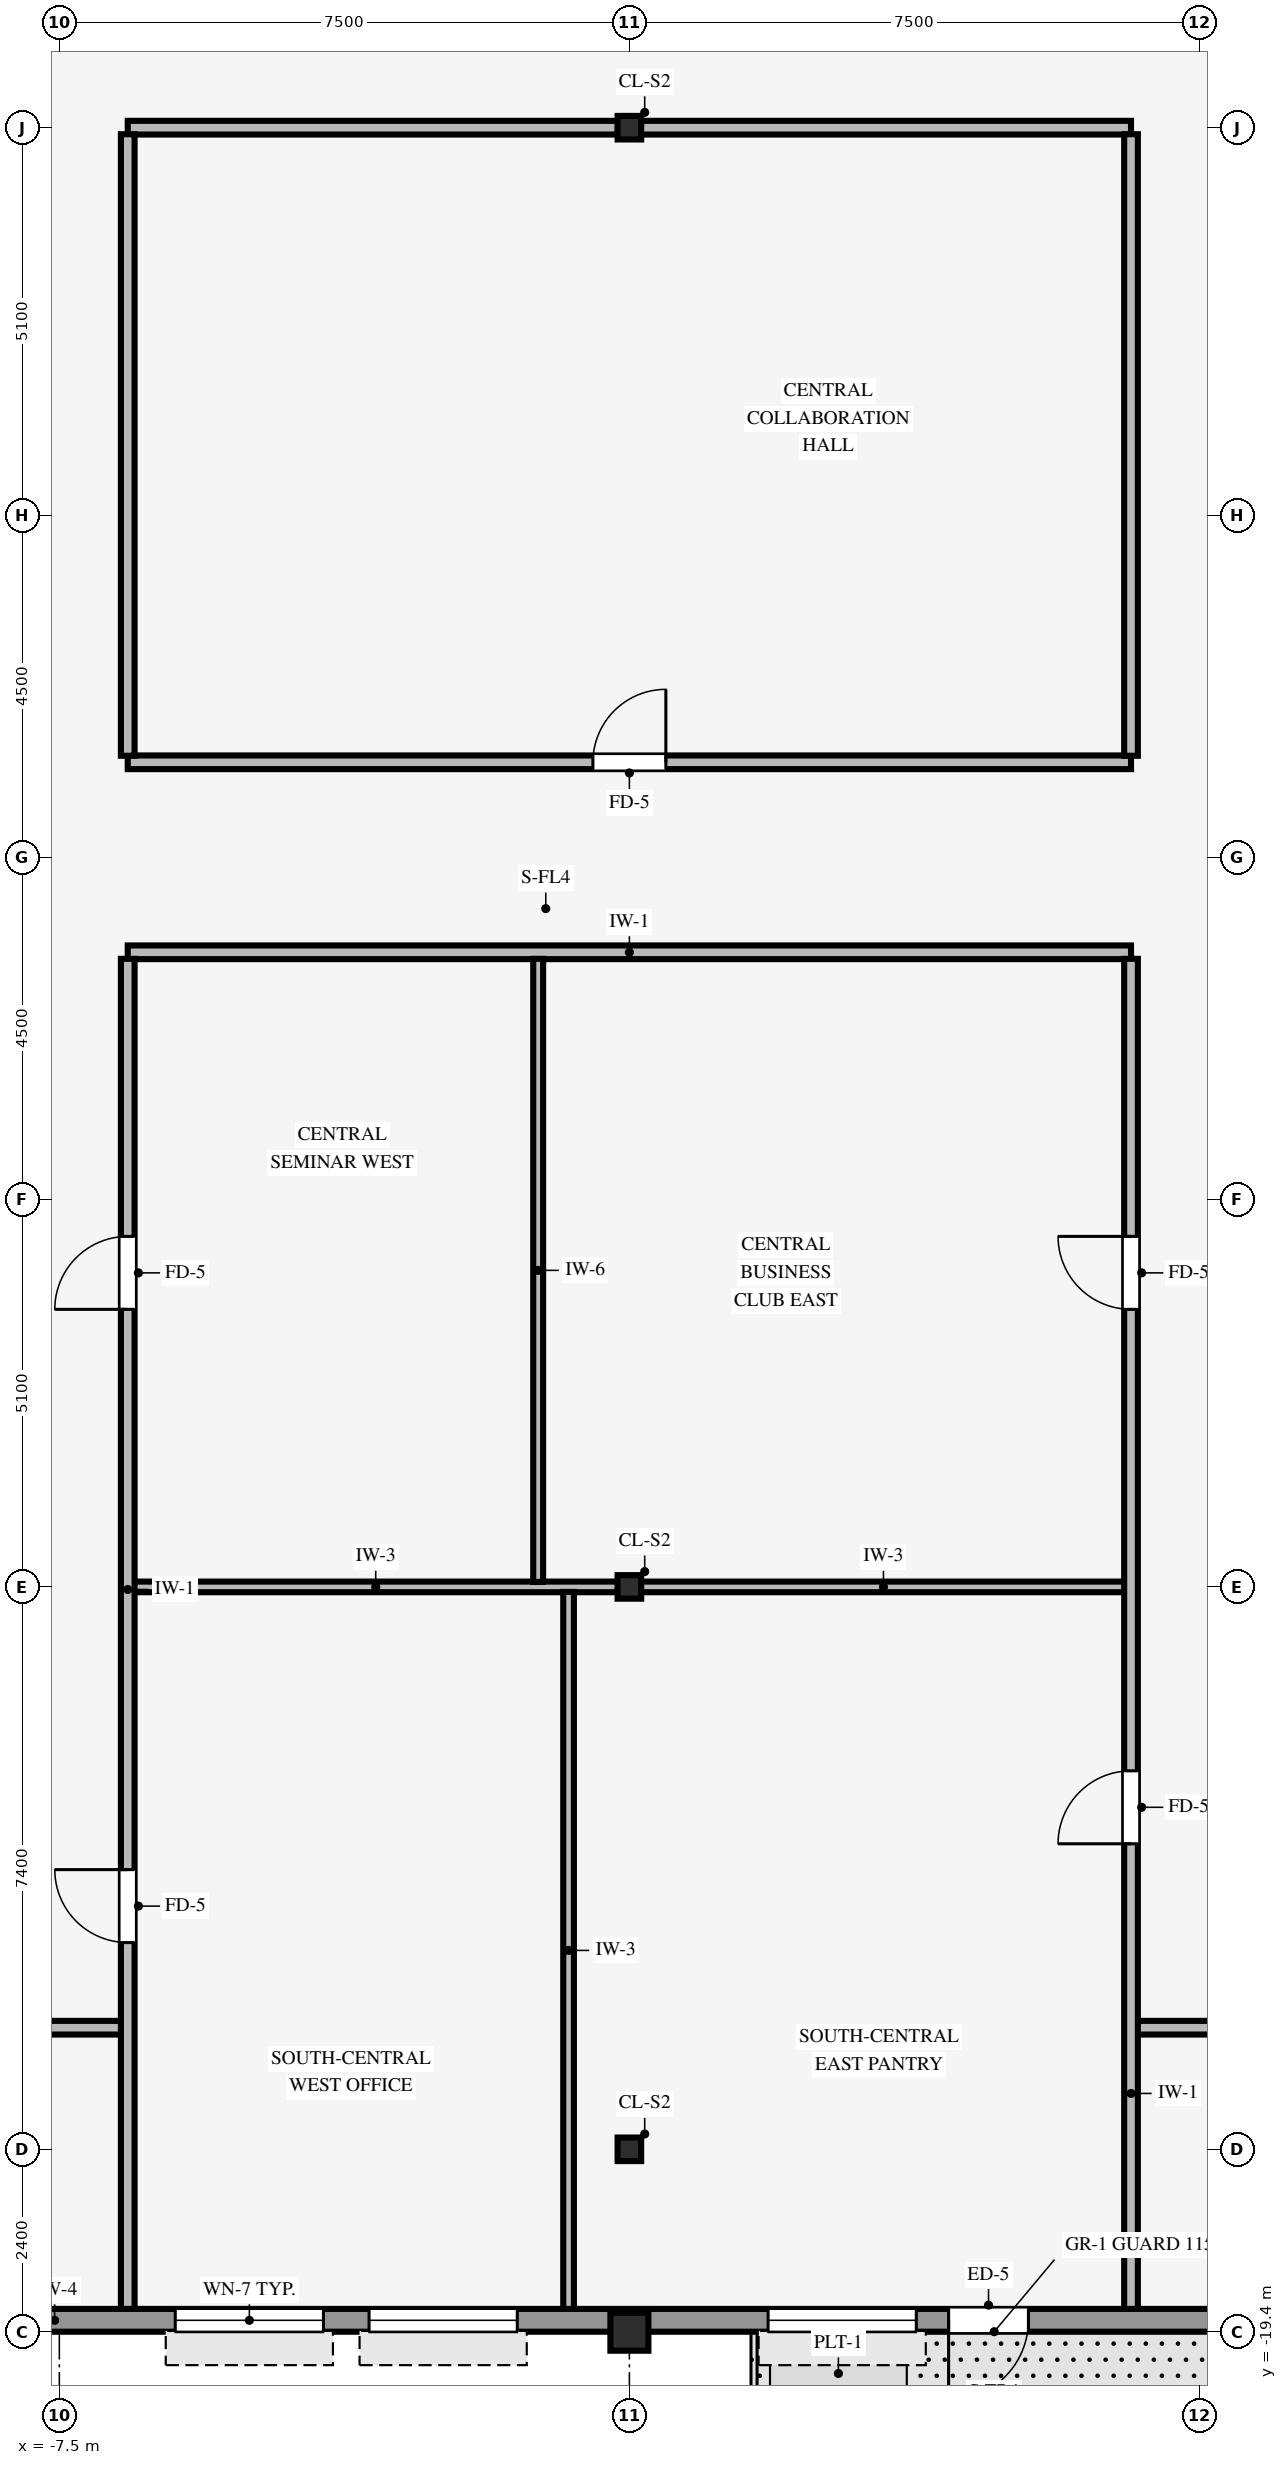
"""IFC4 building model, lengths in metres.
Left out: names, types, materials, properties, quantities, classifications, styles, units other than length and angle.
Written with IfcOpenShell. Run it as: python <this file> out.ifc"""

import sys

from ifc_helpers import new_model, si_unit, direction, frame, frame_2d, origin, origin_2d, place, context, subcontext, project, spatial, rectangle, hollow_rectangle, i_section, extrude, source, transform, mapped, element, fill, save


model = new_model("IFC4")
c1 = context("Model", 3, precision=1e-05, world=origin(), true_north=direction((0.0, 1.0)))
c2 = subcontext(c1, "Body", "Model", "MODEL_VIEW")
j1 = project(units=[si_unit("LENGTHUNIT", "METRE"), si_unit("PLANEANGLEUNIT", "RADIAN")], contexts=[c1])
p1 = place(None, origin())
s1 = spatial("IfcSite", under=j1, at=p1, CompositionType="ELEMENT")
p2 = place(p1, origin())
s2 = spatial("IfcBuilding", under=s1, at=p2, CompositionType="ELEMENT")
p3 = place(p2, frame((0.0, 0.0, 261.6)))
s3 = spatial("IfcBuildingStorey", under=s2, at=p3, CompositionType="ELEMENT", Elevation=261.6)
p4 = place(p3, frame((0.0, -19.4, 0.0), z_axis=(0.0, 0.0, 1.0), x_axis=(1.0, 0.0, 0.0)))
e1 = element("IfcColumn", 1, at=p4, inside=s3, PredefinedType="COLUMN", context=c2, shape_type="SweptSolid", body=[
    extrude(hollow_rectangle(XDim=0.5, YDim=0.5, WallThickness=0.032, InnerFilletRadius=0.032, OuterFilletRadius=0.064, at=origin_2d()), origin(), (0.0, 0.0, 1.0), 3.37),
])
for number, where, z_axis, x_axis in (
    (2, (0.0, -17.0, 0.0), (0.0, 0.0, 1.0), (1.0, 0.0, 0.0)),
    (3, (0.0, -9.6, 0.0), (0.0, 0.0, 1.0), (1.0, 0.0, 0.0)),
    (4, (0.0, 9.6, 0.0), (0.0, 0.0, 1.0), (1.0, 0.0, 0.0)),
):
    element("IfcColumn", number, at=place(p3, frame(where, z_axis=z_axis, x_axis=x_axis)), inside=s3, PredefinedType="COLUMN", context=c2, shape_type="SweptSolid", body=[
        extrude(i_section(OverallWidth=0.31, OverallDepth=0.31, WebThickness=0.015, FlangeThickness=0.015, FilletRadius=0.015, at=origin_2d()), origin(), (0.0, 0.0, 1.0), 3.37),
    ])
p5 = place(p3, frame((-18.9, -19.25, 0.0), z_axis=(0.0, 0.0, 1.0), x_axis=(1.0, 0.0, 0.0)))
e5 = element("IfcWall", 5, at=p5, inside=s3, PredefinedType="STANDARD", context=c2, shape_type="SweptSolid", body=[
    extrude(rectangle(XDim=35.6, YDim=0.3, at=frame_2d((17.8, 0.0))), origin(), (0.0, 0.0, 1.0), 2.705),
])
p6 = place(p5, frame((24.15, 0.0, 0.0), z_axis=(0.0, 0.0, 1.0), x_axis=(-1.0, 0.0, 0.0)))
e6 = element("IfcOpeningElement", 6, at=p6, cuts=e5, PredefinedType="OPENING", context=c2, shape_type="SweptSolid", body=[
    extrude(rectangle(XDim=1.05, YDim=2.1, at=frame_2d((0.525, 1.05))), frame((0.0, 0.16, 0.0), z_axis=(0.0, -1.0, 0.0), x_axis=(1.0, 0.0, 0.0)), (0.0, 0.0, 1.0), 0.32),
])
p7 = place(p5, frame((2.425, 0.0, 0.8)))
e7 = element("IfcOpeningElement", 7, at=p7, cuts=e5, PredefinedType="OPENING", context=c2, shape_type="SweptSolid", body=[
    extrude(rectangle(XDim=1.95, YDim=1.48, at=frame_2d((0.975, 0.74))), frame((0.0, 0.16, 0.0), z_axis=(0.0, -1.0, 0.0), x_axis=(1.0, 0.0, 0.0)), (0.0, 0.0, 1.0), 0.32),
])
p8 = place(p5, frame((7.225, 0.0, 0.8)))
e8 = element("IfcOpeningElement", 8, at=p8, cuts=e5, PredefinedType="OPENING", context=c2, shape_type="SweptSolid", body=[
    extrude(rectangle(XDim=1.95, YDim=1.48, at=frame_2d((0.975, 0.74))), frame((0.0, 0.16, 0.0), z_axis=(0.0, -1.0, 0.0), x_axis=(1.0, 0.0, 0.0)), (0.0, 0.0, 1.0), 0.32),
])
p9 = place(p5, frame((12.925, 0.0, 0.8)))
e9 = element("IfcOpeningElement", 9, at=p9, cuts=e5, PredefinedType="OPENING", context=c2, shape_type="SweptSolid", body=[
    extrude(rectangle(XDim=1.95, YDim=1.48, at=frame_2d((0.975, 0.74))), frame((0.0, 0.16, 0.0), z_axis=(0.0, -1.0, 0.0), x_axis=(1.0, 0.0, 0.0)), (0.0, 0.0, 1.0), 0.32),
])
p10 = place(p5, frame((15.475, 0.0, 0.8)))
e10 = element("IfcOpeningElement", 10, at=p10, cuts=e5, PredefinedType="OPENING", context=c2, shape_type="SweptSolid", body=[
    extrude(rectangle(XDim=1.95, YDim=1.48, at=frame_2d((0.975, 0.74))), frame((0.0, 0.16, 0.0), z_axis=(0.0, -1.0, 0.0), x_axis=(1.0, 0.0, 0.0)), (0.0, 0.0, 1.0), 0.32),
])
p11 = place(p5, frame((20.725, 0.0, 0.8)))
e11 = element("IfcOpeningElement", 11, at=p11, cuts=e5, PredefinedType="OPENING", context=c2, shape_type="SweptSolid", body=[
    extrude(rectangle(XDim=1.95, YDim=1.48, at=frame_2d((0.975, 0.74))), frame((0.0, 0.16, 0.0), z_axis=(0.0, -1.0, 0.0), x_axis=(1.0, 0.0, 0.0)), (0.0, 0.0, 1.0), 0.32),
])
p12 = place(p5, frame((31.225, 0.0, 0.8)))
e12 = element("IfcOpeningElement", 12, at=p12, cuts=e5, PredefinedType="OPENING", context=c2, shape_type="SweptSolid", body=[
    extrude(rectangle(XDim=1.95, YDim=1.48, at=frame_2d((0.975, 0.74))), frame((0.0, 0.16, 0.0), z_axis=(0.0, -1.0, 0.0), x_axis=(1.0, 0.0, 0.0)), (0.0, 0.0, 1.0), 0.32),
])
p13 = place(p3, frame((-9.0, -15.4, 0.0), z_axis=(0.0, 0.0, 1.0), x_axis=(1.0, 0.0, 0.0)))
e13 = element("IfcWall", 13, at=p13, inside=s3, PredefinedType="PARTITIONING", context=c2, shape_type="SweptSolid", body=[
    extrude(rectangle(XDim=2.324, YDim=0.18, at=frame_2d((1.162, 0.0))), origin(), (0.0, 0.0, 1.0), 3.36),
])
p14 = place(p3, frame((6.666, -15.4, 0.0), z_axis=(0.0, 0.0, 1.0), x_axis=(1.0, 0.0, 0.0)))
e14 = element("IfcWall", 14, at=p14, inside=s3, PredefinedType="PARTITIONING", context=c2, shape_type="SweptSolid", body=[
    extrude(rectangle(XDim=2.334, YDim=0.18, at=frame_2d((1.167, 0.0))), origin(), (0.0, 0.0, 1.0), 3.36),
])
p15 = place(p3, frame((-6.524, -9.6, 0.0), z_axis=(0.0, 0.0, 1.0), x_axis=(1.0, 0.0, 0.0)))
e15 = element("IfcWall", 15, at=p15, inside=s3, PredefinedType="PARTITIONING", context=c2, shape_type="SweptSolid", body=[
    extrude(rectangle(XDim=6.373, YDim=0.14, at=frame_2d((3.187, 0.0))), origin(), (0.0, 0.0, 1.0), 2.405),
])
p16 = place(p3, frame((0.151, -9.6, 0.0), z_axis=(0.0, 0.0, 1.0), x_axis=(1.0, 0.0, 0.0)))
e16 = element("IfcWall", 16, at=p16, inside=s3, PredefinedType="PARTITIONING", context=c2, shape_type="SweptSolid", body=[
    extrude(rectangle(XDim=6.383, YDim=0.14, at=frame_2d((3.191, 0.0))), origin(), (0.0, 0.0, 1.0), 2.405),
])
p17 = place(p3, frame((-6.6, -1.25, 0.0), z_axis=(0.0, 0.0, 1.0), x_axis=(1.0, 0.0, 0.0)))
e17 = element("IfcWall", 17, at=p17, inside=s3, PredefinedType="PARTITIONING", context=c2, shape_type="SweptSolid", body=[
    extrude(rectangle(XDim=13.2, YDim=0.18, at=frame_2d((6.6, 0.0))), origin(), (0.0, 0.0, 1.0), 3.36),
])
p18 = place(p3, frame((-6.6, 1.25, 0.0), z_axis=(0.0, 0.0, 1.0), x_axis=(1.0, 0.0, 0.0)))
e18 = element("IfcWall", 18, at=p18, inside=s3, PredefinedType="PARTITIONING", context=c2, shape_type="SweptSolid", body=[
    extrude(rectangle(XDim=13.2, YDim=0.18, at=frame_2d((6.6, 0.0))), origin(), (0.0, 0.0, 1.0), 3.36),
])
p19 = place(p18, frame((6.12, 0.0, 0.0)))
e19 = element("IfcOpeningElement", 19, at=p19, cuts=e18, PredefinedType="OPENING", context=c2, shape_type="SweptSolid", body=[
    extrude(rectangle(XDim=0.96, YDim=2.1, at=frame_2d((0.48, 1.05))), frame((0.0, 0.1, 0.0), z_axis=(0.0, -1.0, 0.0), x_axis=(1.0, 0.0, 0.0)), (0.0, 0.0, 1.0), 0.2),
])
for number, where, z_axis, x_axis in (
    (20, (-6.6, 9.6, 0.0), (0.0, 0.0, 1.0), (1.0, 0.0, 0.0)),
    (21, (0.151, 9.6, 0.0), (0.0, 0.0, 1.0), (1.0, 0.0, 0.0)),
):
    element("IfcWall", number, at=place(p3, frame(where, z_axis=z_axis, x_axis=x_axis)), inside=s3, PredefinedType="PARTITIONING", context=c2, shape_type="SweptSolid", body=[
        extrude(rectangle(XDim=6.449, YDim=0.18, at=frame_2d((3.225, 0.0))), origin(), (0.0, 0.0, 1.0), 2.405),
    ])
p20 = place(p3, frame((-6.6, -19.1, 0.0), z_axis=(0.0, 0.0, 1.0), x_axis=(0.0, 1.0, 0.0)))
e22 = element("IfcWall", 22, at=p20, inside=s3, PredefinedType="PARTITIONING", context=c2, shape_type="SweptSolid", body=[
    extrude(rectangle(XDim=17.764, YDim=0.18, at=frame_2d((8.882, 0.0))), origin(), (0.0, 0.0, 1.0), 3.36),
])
p21 = place(p20, frame((13.152, 0.0, 0.0)))
e23 = element("IfcOpeningElement", 23, at=p21, cuts=e22, PredefinedType="OPENING", context=c2, shape_type="SweptSolid", body=[
    extrude(rectangle(XDim=0.96, YDim=2.1, at=frame_2d((0.48, 1.05))), frame((0.0, 0.1, 0.0), z_axis=(0.0, -1.0, 0.0), x_axis=(1.0, 0.0, 0.0)), (0.0, 0.0, 1.0), 0.2),
])
p22 = place(p20, frame((4.82, 0.0, 0.0)))
e24 = element("IfcOpeningElement", 24, at=p22, cuts=e22, PredefinedType="OPENING", context=c2, shape_type="SweptSolid", body=[
    extrude(rectangle(XDim=0.96, YDim=2.1, at=frame_2d((0.48, 1.05))), frame((0.0, 0.1, 0.0), z_axis=(0.0, -1.0, 0.0), x_axis=(1.0, 0.0, 0.0)), (0.0, 0.0, 1.0), 0.2),
])
p23 = place(p3, frame((-6.6, 1.336, 0.0), z_axis=(0.0, 0.0, 1.0), x_axis=(0.0, 1.0, 0.0)))
e25 = element("IfcWall", 25, at=p23, inside=s3, PredefinedType="PARTITIONING", context=c2, shape_type="SweptSolid", body=[
    extrude(rectangle(XDim=8.178, YDim=0.18, at=frame_2d((4.089, 0.0))), origin(), (0.0, 0.0, 1.0), 3.36),
])
p24 = place(p3, frame((-1.2, -9.534, 0.0), z_axis=(0.0, 0.0, 1.0), x_axis=(0.0, 1.0, 0.0)))
e26 = element("IfcWall", 26, at=p24, inside=s3, PredefinedType="PARTITIONING", context=c2, shape_type="SweptSolid", body=[
    extrude(rectangle(XDim=8.198, YDim=0.13, at=frame_2d((4.099, 0.0))), origin(), (0.0, 0.0, 1.0), 3.36),
])
p25 = place(p3, frame((-0.8, -19.1, 0.0), z_axis=(0.0, 0.0, 1.0), x_axis=(0.0, 1.0, 0.0)))
e27 = element("IfcWall", 27, at=p25, inside=s3, PredefinedType="PARTITIONING", context=c2, shape_type="SweptSolid", body=[
    extrude(rectangle(XDim=9.434, YDim=0.14, at=frame_2d((4.717, 0.0))), origin(), (0.0, 0.0, 1.0), 3.36),
])
p26 = place(p3, frame((6.6, -19.1, 0.0), z_axis=(0.0, 0.0, 1.0), x_axis=(0.0, 1.0, 0.0)))
e28 = element("IfcWall", 28, at=p26, inside=s3, PredefinedType="PARTITIONING", context=c2, shape_type="SweptSolid", body=[
    extrude(rectangle(XDim=17.764, YDim=0.18, at=frame_2d((8.882, 0.0))), origin(), (0.0, 0.0, 1.0), 3.36),
])
p27 = place(p26, frame((13.152, 0.0, 0.0)))
e29 = element("IfcOpeningElement", 29, at=p27, cuts=e28, PredefinedType="OPENING", context=c2, shape_type="SweptSolid", body=[
    extrude(rectangle(XDim=0.96, YDim=2.1, at=frame_2d((0.48, 1.05))), frame((0.0, 0.1, 0.0), z_axis=(0.0, -1.0, 0.0), x_axis=(1.0, 0.0, 0.0)), (0.0, 0.0, 1.0), 0.2),
])
p28 = place(p26, frame((6.12, 0.0, 0.0)))
e30 = element("IfcOpeningElement", 30, at=p28, cuts=e28, PredefinedType="OPENING", context=c2, shape_type="SweptSolid", body=[
    extrude(rectangle(XDim=0.96, YDim=2.1, at=frame_2d((0.48, 1.05))), frame((0.0, 0.1, 0.0), z_axis=(0.0, -1.0, 0.0), x_axis=(1.0, 0.0, 0.0)), (0.0, 0.0, 1.0), 0.2),
])
p29 = place(p3, frame((6.6, 1.336, 0.0), z_axis=(0.0, 0.0, 1.0), x_axis=(0.0, 1.0, 0.0)))
e31 = element("IfcWall", 31, at=p29, inside=s3, PredefinedType="PARTITIONING", context=c2, shape_type="SweptSolid", body=[
    extrude(rectangle(XDim=8.178, YDim=0.18, at=frame_2d((4.089, 0.0))), origin(), (0.0, 0.0, 1.0), 3.36),
])
m1 = source(origin(), c2, "Body", "SweptSolid", [
    extrude(rectangle(XDim=1.05, YDim=2.1, at=frame_2d((0.525, 1.05))), frame((0.0, 0.025, 0.0), z_axis=(0.0, -1.0, 0.0), x_axis=(1.0, 0.0, 0.0)), (0.0, 0.0, 1.0), 0.05),
])
p30 = place(p6, origin())
e32 = element("IfcDoor", 32, at=p30, inside=s3, OperationType="SINGLE_SWING_RIGHT", PredefinedType="DOOR", context=c2, shape_type="MappedRepresentation", body=[
    mapped(m1, transform((0.0, 0.0, 0.0), scale=1.0)),
])
fill(e6, e32)
m2 = source(origin(), c2, "Body", "SweptSolid", [
    extrude(rectangle(XDim=1.95, YDim=1.48, at=frame_2d((0.975, 0.74))), frame((0.0, 0.03, 0.0), z_axis=(0.0, -1.0, 0.0), x_axis=(1.0, 0.0, 0.0)), (0.0, 0.0, 1.0), 0.06),
])
p31 = place(p9, origin())
e33 = element("IfcWindow", 33, at=p31, inside=s3, PartitioningType="SINGLE_PANEL", PredefinedType="WINDOW", context=c2, shape_type="MappedRepresentation", body=[
    mapped(m2, transform((0.0, 0.0, 0.0), scale=1.0)),
])
fill(e9, e33)
p32 = place(p10, origin())
e34 = element("IfcWindow", 34, at=p32, inside=s3, PartitioningType="SINGLE_PANEL", PredefinedType="WINDOW", context=c2, shape_type="MappedRepresentation", body=[
    mapped(m2, transform((0.0, 0.0, 0.0), scale=1.0)),
])
fill(e10, e34)
p33 = place(p11, origin())
e35 = element("IfcWindow", 35, at=p33, inside=s3, PartitioningType="SINGLE_PANEL", PredefinedType="WINDOW", context=c2, shape_type="MappedRepresentation", body=[
    mapped(m2, transform((0.0, 0.0, 0.0), scale=1.0)),
])
fill(e11, e35)
m3 = source(origin(), c2, "Body", "SweptSolid", [
    extrude(rectangle(XDim=0.96, YDim=2.1, at=frame_2d((0.48, 1.05))), frame((0.0, 0.025, 0.0), z_axis=(0.0, -1.0, 0.0), x_axis=(1.0, 0.0, 0.0)), (0.0, 0.0, 1.0), 0.05),
])
p34 = place(p19, origin())
e36 = element("IfcDoor", 36, at=p34, inside=s3, OperationType="SINGLE_SWING_RIGHT", PredefinedType="DOOR", context=c2, shape_type="MappedRepresentation", body=[
    mapped(m3, transform((0.0, 0.0, 0.0), scale=1.0)),
])
fill(e19, e36)
p35 = place(p21, origin())
e37 = element("IfcDoor", 37, at=p35, inside=s3, OperationType="SINGLE_SWING_LEFT", PredefinedType="DOOR", context=c2, shape_type="MappedRepresentation", body=[
    mapped(m3, transform((0.0, 0.0, 0.0), scale=1.0)),
])
fill(e23, e37)
p36 = place(p27, origin())
e38 = element("IfcDoor", 38, at=p36, inside=s3, OperationType="SINGLE_SWING_RIGHT", PredefinedType="DOOR", context=c2, shape_type="MappedRepresentation", body=[
    mapped(m3, transform((0.0, 0.0, 0.0), scale=1.0)),
])
fill(e29, e38)
p37 = place(p28, origin())
e39 = element("IfcDoor", 39, at=p37, inside=s3, OperationType="SINGLE_SWING_LEFT", PredefinedType="DOOR", context=c2, shape_type="MappedRepresentation", body=[
    mapped(m3, transform((0.0, 0.0, 0.0), scale=1.0)),
])
fill(e30, e39)
p38 = place(p22, origin())
e40 = element("IfcDoor", 40, at=p38, inside=s3, OperationType="SINGLE_SWING_RIGHT", PredefinedType="DOOR", context=c2, shape_type="MappedRepresentation", body=[
    mapped(m3, transform((0.0, 0.0, 0.0), scale=1.0)),
])
fill(e24, e40)
save(model, sys.argv[1])
